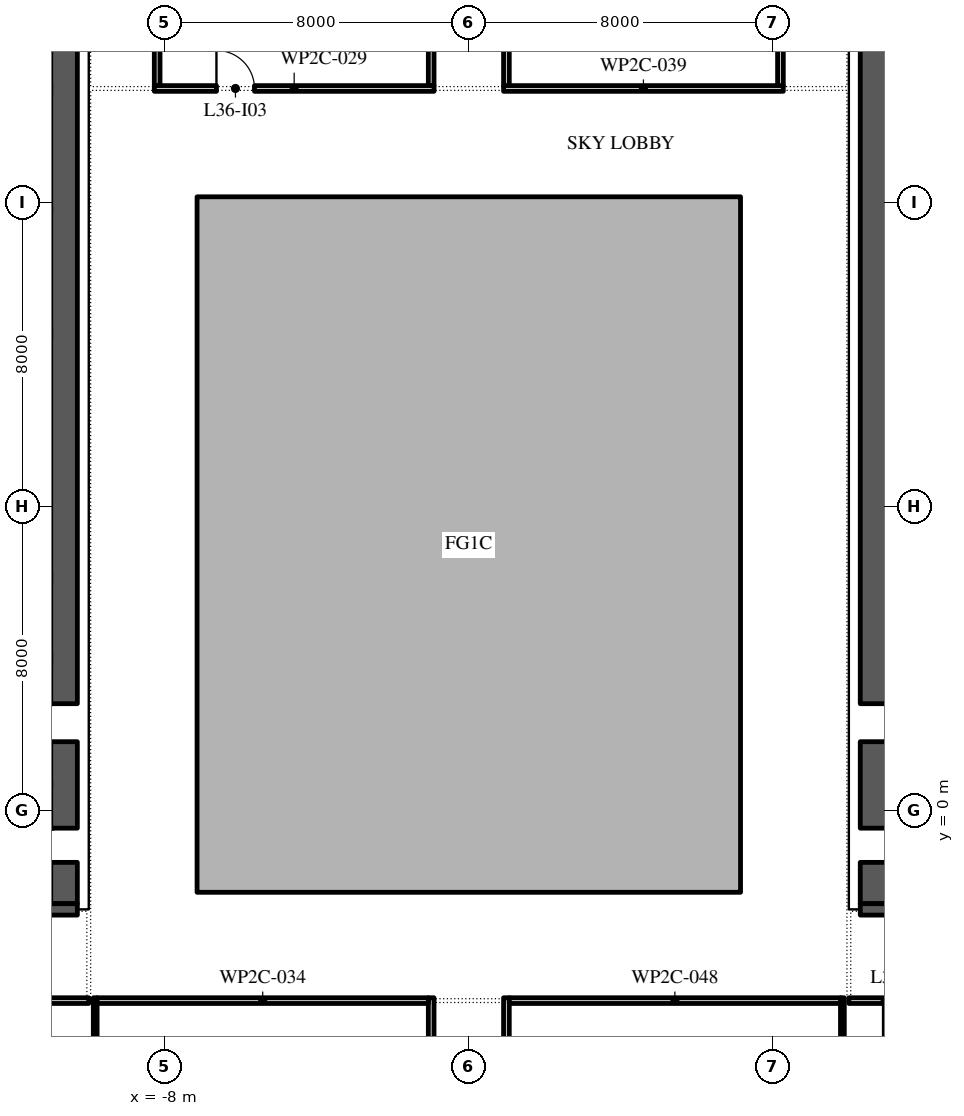
"""IFC4 building model, lengths in metres.
Left out: names, types, materials, properties, quantities, classifications, styles, units other than length and angle.
Written with IfcOpenShell. Run it as: python <this file> out.ifc"""

import sys

from ifc_helpers import new_model, si_unit, direction, frame, frame_2d, origin, place, context, subcontext, project, spatial, polyline, rectangle, outline, extrude, element, fill, save


model = new_model("IFC4")
c1 = context("Model", 3, precision=1e-05, world=origin(), true_north=direction((0.0, 1.0)))
c2 = subcontext(c1, "Body", "Model", "MODEL_VIEW")
j1 = project(units=[si_unit("LENGTHUNIT", "METRE"), si_unit("PLANEANGLEUNIT", "RADIAN")], contexts=[c1])
p1 = place(None, origin())
s1 = spatial("IfcSite", under=j1, at=p1, CompositionType="ELEMENT")
p2 = place(p1, origin())
s2 = spatial("IfcBuilding", under=s1, at=p2, CompositionType="ELEMENT")
p3 = place(p2, frame((0.0, 0.0, 165.6)))
s3 = spatial("IfcBuildingStorey", under=s2, at=p3, CompositionType="ELEMENT", Elevation=165.6)
p4 = place(p3, origin())
e1 = element("IfcWall", 1, at=p4, inside=s3, PredefinedType="STANDARD", context=c2, shape_type="SweptSolid", body=[
    extrude(outline(polyline([(-7.15, -2.15), (7.15, -2.15), (7.15, 16.15), (-7.15, 16.15), (-7.15, -2.15)]), holes=[polyline([(-7.0, -2.0), (-7.0, 16.0), (7.0, 16.0), (7.0, -2.0), (-7.0, -2.0)])]), origin(), (0.0, 0.0, 1.0), 5.8),
])
p5 = place(p3, frame((-10.65, -2.45, 0.0), z_axis=(0.0, 0.0, 1.0), x_axis=(0.0, 1.0, 0.0)))
e2 = element("IfcWall", 2, at=p5, inside=s3, PredefinedType="SHEAR", context=c2, shape_type="SweptSolid", body=[
    extrude(rectangle(XDim=27.9, YDim=0.7, at=frame_2d((13.95, 0.0))), origin(), (0.0, 0.0, 1.0), 5.8),
])
p6 = place(p5, frame((23.65, 0.0, 0.0)))
e3 = element("IfcOpeningElement", 3, at=p6, cuts=e2, PredefinedType="OPENING", context=c2, shape_type="SweptSolid", body=[
    extrude(rectangle(XDim=2.4, YDim=2.1, at=frame_2d((1.2, 1.05))), frame((0.0, 0.36, 0.0), z_axis=(0.0, -1.0, 0.0), x_axis=(1.0, 0.0, 0.0)), (0.0, 0.0, 1.0), 0.72),
])
p7 = place(p5, frame((1.087, 0.0, 0.0)))
e4 = element("IfcOpeningElement", 4, at=p7, cuts=e2, PredefinedType="OPENING", context=c2, shape_type="SweptSolid", body=[
    extrude(rectangle(XDim=0.9, YDim=2.1, at=frame_2d((0.45, 1.05))), frame((0.0, 0.36, 0.0), z_axis=(0.0, -1.0, 0.0), x_axis=(1.0, 0.0, 0.0)), (0.0, 0.0, 1.0), 0.72),
])
p8 = place(p5, frame((4.262, 0.0, 0.0)))
e5 = element("IfcOpeningElement", 5, at=p8, cuts=e2, PredefinedType="OPENING", context=c2, shape_type="SweptSolid", body=[
    extrude(rectangle(XDim=1.0, YDim=2.1, at=frame_2d((0.5, 1.05))), frame((0.0, 0.36, 0.0), z_axis=(0.0, -1.0, 0.0), x_axis=(1.0, 0.0, 0.0)), (0.0, 0.0, 1.0), 0.72),
])
p9 = place(p3, frame((-21.7, -2.6, 0.0), z_axis=(0.0, 0.0, 1.0), x_axis=(1.0, 0.0, 0.0)))
e6 = element("IfcWall", 6, at=p9, inside=s3, PredefinedType="SHEAR", context=c2, shape_type="SweptSolid", body=[
    extrude(rectangle(XDim=11.4, YDim=0.3, at=frame_2d((5.7, 0.0))), origin(), (0.0, 0.0, 1.0), 5.8),
])
p10 = place(p3, frame((10.65, -2.45, 0.0), z_axis=(0.0, 0.0, 1.0), x_axis=(0.0, 1.0, 0.0)))
e7 = element("IfcWall", 7, at=p10, inside=s3, PredefinedType="SHEAR", context=c2, shape_type="SweptSolid", body=[
    extrude(rectangle(XDim=27.9, YDim=0.7, at=frame_2d((13.95, 0.0))), origin(), (0.0, 0.0, 1.0), 5.8),
])
p11 = place(p10, frame((23.65, 0.0, 0.0)))
e8 = element("IfcOpeningElement", 8, at=p11, cuts=e7, PredefinedType="OPENING", context=c2, shape_type="SweptSolid", body=[
    extrude(rectangle(XDim=2.4, YDim=2.1, at=frame_2d((1.2, 1.05))), frame((0.0, 0.36, 0.0), z_axis=(0.0, -1.0, 0.0), x_axis=(1.0, 0.0, 0.0)), (0.0, 0.0, 1.0), 0.72),
])
p12 = place(p10, frame((1.087, 0.0, 0.0)))
e9 = element("IfcOpeningElement", 9, at=p12, cuts=e7, PredefinedType="OPENING", context=c2, shape_type="SweptSolid", body=[
    extrude(rectangle(XDim=0.9, YDim=2.1, at=frame_2d((0.45, 1.05))), frame((0.0, 0.36, 0.0), z_axis=(0.0, -1.0, 0.0), x_axis=(1.0, 0.0, 0.0)), (0.0, 0.0, 1.0), 0.72),
])
p13 = place(p10, frame((4.262, 0.0, 0.0)))
e10 = element("IfcOpeningElement", 10, at=p13, cuts=e7, PredefinedType="OPENING", context=c2, shape_type="SweptSolid", body=[
    extrude(rectangle(XDim=1.0, YDim=2.1, at=frame_2d((0.5, 1.05))), frame((0.0, 0.36, 0.0), z_axis=(0.0, -1.0, 0.0), x_axis=(1.0, 0.0, 0.0)), (0.0, 0.0, 1.0), 0.72),
])
p14 = place(p3, frame((10.3, -2.6, 0.0), z_axis=(0.0, 0.0, 1.0), x_axis=(1.0, 0.0, 0.0)))
e11 = element("IfcWall", 11, at=p14, inside=s3, PredefinedType="SHEAR", context=c2, shape_type="SweptSolid", body=[
    extrude(rectangle(XDim=11.4, YDim=0.3, at=frame_2d((5.7, 0.0))), origin(), (0.0, 0.0, 1.0), 5.8),
])
p15 = place(p3, frame((-10.0, -5.0, 0.0), z_axis=(0.0, 0.0, 1.0), x_axis=(-1.0, 0.0, 0.0)))
e12 = element("IfcWall", 12, at=p15, inside=s3, PredefinedType="PARTITIONING", context=c2, shape_type="SweptSolid", body=[
    extrude(rectangle(XDim=8.45, YDim=0.15, at=frame_2d((4.225, 0.0))), origin(), (0.0, 0.0, 1.0), 5.8),
])
p16 = place(p15, frame((2.85, 0.0, 0.0)))
e13 = element("IfcOpeningElement", 13, at=p16, cuts=e12, PredefinedType="OPENING", context=c2, shape_type="SweptSolid", body=[
    extrude(rectangle(XDim=1.0, YDim=2.1, at=frame_2d((0.5, 1.05))), frame((0.0, 0.085, 0.0), z_axis=(0.0, -1.0, 0.0), x_axis=(1.0, 0.0, 0.0)), (0.0, 0.0, 1.0), 0.17),
])
p17 = place(p3, frame((-9.83, -15.0, 0.0), z_axis=(0.0, 0.0, 1.0), x_axis=(0.0, 1.0, 0.0)))
e14 = element("IfcWall", 14, at=p17, inside=s3, PredefinedType="PARTITIONING", context=c2, shape_type="SweptSolid", body=[
    extrude(rectangle(XDim=10.075, YDim=0.1, at=frame_2d((5.038, 0.0))), origin(), (0.0, 0.0, 1.0), 5.8),
])
p18 = place(p3, frame((-8.275, 19.0, 0.0), z_axis=(0.0, 0.0, 1.0), x_axis=(1.0, 0.0, 0.0)))
e15 = element("IfcWall", 15, at=p18, inside=s3, PredefinedType="PARTITIONING", context=c2, shape_type="SweptSolid", body=[
    extrude(rectangle(XDim=7.36, YDim=0.15, at=frame_2d((3.68, 0.0))), origin(), (0.0, 0.0, 1.0), 5.8),
])
p19 = place(p18, frame((1.635, 0.0, 0.0)))
e16 = element("IfcOpeningElement", 16, at=p19, cuts=e15, PredefinedType="OPENING", context=c2, shape_type="SweptSolid", body=[
    extrude(rectangle(XDim=1.0, YDim=2.1, at=frame_2d((0.5, 1.05))), frame((0.0, 0.085, 0.0), z_axis=(0.0, -1.0, 0.0), x_axis=(1.0, 0.0, 0.0)), (0.0, 0.0, 1.0), 0.17),
])
p20 = place(p3, frame((-8.2, 23.54, 0.0), z_axis=(0.0, 0.0, 1.0), x_axis=(0.0, -1.0, 0.0)))
e17 = element("IfcWall", 17, at=p20, inside=s3, PredefinedType="PARTITIONING", context=c2, shape_type="SweptSolid", body=[
    extrude(rectangle(XDim=4.465, YDim=0.15, at=frame_2d((2.232, 0.0))), origin(), (0.0, 0.0, 1.0), 5.8),
])
p21 = place(p3, frame((-0.99, -16.753, 0.0), z_axis=(0.0, 0.0, 1.0), x_axis=(0.0, 1.0, 0.0)))
e18 = element("IfcWall", 18, at=p21, inside=s3, PredefinedType="PARTITIONING", context=c2, shape_type="SweptSolid", body=[
    extrude(rectangle(XDim=11.828, YDim=0.15, at=frame_2d((5.914, 0.0))), origin(), (0.0, 0.0, 1.0), 5.8),
])
p22 = place(p21, frame((2.853, 0.0, 0.0)))
e19 = element("IfcOpeningElement", 19, at=p22, cuts=e18, PredefinedType="OPENING", context=c2, shape_type="SweptSolid", body=[
    extrude(rectangle(XDim=1.0, YDim=2.1, at=frame_2d((0.5, 1.05))), frame((0.0, 0.085, 0.0), z_axis=(0.0, -1.0, 0.0), x_axis=(1.0, 0.0, 0.0)), (0.0, 0.0, 1.0), 0.17),
])
p23 = place(p3, frame((-1.065, -5.0, 0.0), z_axis=(0.0, 0.0, 1.0), x_axis=(-1.0, 0.0, 0.0)))
e20 = element("IfcWall", 20, at=p23, inside=s3, PredefinedType="PARTITIONING", context=c2, shape_type="SweptSolid", body=[
    extrude(rectangle(XDim=8.715, YDim=0.15, at=frame_2d((4.357, 0.0))), origin(), (0.0, 0.0, 1.0), 5.8),
])
p24 = place(p3, frame((-0.99, 19.075, 0.0), z_axis=(0.0, 0.0, 1.0), x_axis=(0.0, 1.0, 0.0)))
e21 = element("IfcWall", 21, at=p24, inside=s3, PredefinedType="PARTITIONING", context=c2, shape_type="SweptSolid", body=[
    extrude(rectangle(XDim=4.365, YDim=0.15, at=frame_2d((2.183, 0.0))), origin(), (0.0, 0.0, 1.0), 5.8),
])
p25 = place(p3, frame((0.99, -4.925, 0.0), z_axis=(0.0, 0.0, 1.0), x_axis=(0.0, -1.0, 0.0)))
e22 = element("IfcWall", 22, at=p25, inside=s3, PredefinedType="PARTITIONING", context=c2, shape_type="SweptSolid", body=[
    extrude(rectangle(XDim=11.371, YDim=0.15, at=frame_2d((5.686, 0.0))), origin(), (0.0, 0.0, 1.0), 5.8),
])
p26 = place(p25, frame((5.445, 0.0, 0.0)))
e23 = element("IfcOpeningElement", 23, at=p26, cuts=e22, PredefinedType="OPENING", context=c2, shape_type="SweptSolid", body=[
    extrude(rectangle(XDim=1.0, YDim=2.1, at=frame_2d((0.5, 1.05))), frame((0.0, 0.085, 0.0), z_axis=(0.0, -1.0, 0.0), x_axis=(1.0, 0.0, 0.0)), (0.0, 0.0, 1.0), 0.17),
])
p27 = place(p3, frame((0.915, 19.0, 0.0), z_axis=(0.0, 0.0, 1.0), x_axis=(1.0, 0.0, 0.0)))
e24 = element("IfcWall", 24, at=p27, inside=s3, PredefinedType="PARTITIONING", context=c2, shape_type="SweptSolid", body=[
    extrude(rectangle(XDim=7.36, YDim=0.15, at=frame_2d((3.68, 0.0))), origin(), (0.0, 0.0, 1.0), 5.8),
])
p28 = place(p3, frame((0.99, 31.55, 0.0), z_axis=(0.0, 0.0, 1.0), x_axis=(0.0, -1.0, 0.0)))
e25 = element("IfcWall", 25, at=p28, inside=s3, PredefinedType="PARTITIONING", context=c2, shape_type="SweptSolid", body=[
    extrude(rectangle(XDim=12.475, YDim=0.15, at=frame_2d((6.238, 0.0))), origin(), (0.0, 0.0, 1.0), 5.8),
])
p29 = place(p28, frame((5.9, 0.0, 0.0)))
e26 = element("IfcOpeningElement", 26, at=p29, cuts=e25, PredefinedType="OPENING", context=c2, shape_type="SweptSolid", body=[
    extrude(rectangle(XDim=1.0, YDim=2.1, at=frame_2d((0.5, 1.05))), frame((0.0, 0.085, 0.0), z_axis=(0.0, -1.0, 0.0), x_axis=(1.0, 0.0, 0.0)), (0.0, 0.0, 1.0), 0.17),
])
p30 = place(p3, frame((8.2, 19.075, 0.0), z_axis=(0.0, 0.0, 1.0), x_axis=(0.0, 1.0, 0.0)))
e27 = element("IfcWall", 27, at=p30, inside=s3, PredefinedType="PARTITIONING", context=c2, shape_type="SweptSolid", body=[
    extrude(rectangle(XDim=8.2, YDim=0.15, at=frame_2d((4.1, 0.0))), origin(), (0.0, 0.0, 1.0), 5.8),
])
p31 = place(p3, frame((9.83, -14.255, 0.0), z_axis=(0.0, 0.0, 1.0), x_axis=(0.0, 1.0, 0.0)))
e28 = element("IfcWall", 28, at=p31, inside=s3, PredefinedType="PARTITIONING", context=c2, shape_type="SweptSolid", body=[
    extrude(rectangle(XDim=9.33, YDim=0.1, at=frame_2d((4.665, 0.0))), origin(), (0.0, 0.0, 1.0), 5.8),
])
p32 = place(p3, frame((9.78, -5.0, 0.0), z_axis=(0.0, 0.0, 1.0), x_axis=(-1.0, 0.0, 0.0)))
e29 = element("IfcWall", 29, at=p32, inside=s3, PredefinedType="PARTITIONING", context=c2, shape_type="SweptSolid", body=[
    extrude(rectangle(XDim=8.715, YDim=0.15, at=frame_2d((4.357, 0.0))), origin(), (0.0, 0.0, 1.0), 5.8),
])
p33 = place(p3, frame((14.38, -5.0, 0.0), z_axis=(0.0, 0.0, 1.0), x_axis=(-1.0, 0.0, 0.0)))
e30 = element("IfcWall", 30, at=p33, inside=s3, PredefinedType="PARTITIONING", context=c2, shape_type="SweptSolid", body=[
    extrude(rectangle(XDim=4.38, YDim=0.15, at=frame_2d((2.19, 0.0))), origin(), (0.0, 0.0, 1.0), 5.8),
])
p34 = place(p33, frame((2.48, 0.0, 0.0)))
e31 = element("IfcOpeningElement", 31, at=p34, cuts=e30, PredefinedType="OPENING", context=c2, shape_type="SweptSolid", body=[
    extrude(rectangle(XDim=1.0, YDim=2.1, at=frame_2d((0.5, 1.05))), frame((0.0, 0.085, 0.0), z_axis=(0.0, -1.0, 0.0), x_axis=(1.0, 0.0, 0.0)), (0.0, 0.0, 1.0), 0.17),
])
p35 = place(p19, origin())
e32 = element("IfcDoor", 32, at=p35, inside=s3, OperationType="SINGLE_SWING_RIGHT", PredefinedType="DOOR", context=c2, shape_type="SweptSolid", body=[
    extrude(rectangle(XDim=1.0, YDim=2.1, at=frame_2d((0.5, 1.05))), frame((0.0, 0.025, 0.0), z_axis=(0.0, -1.0, 0.0), x_axis=(1.0, 0.0, 0.0)), (0.0, 0.0, 1.0), 0.05),
])
fill(e16, e32)
p36 = place(p34, origin())
e33 = element("IfcDoor", 33, at=p36, inside=s3, OperationType="SINGLE_SWING_LEFT", PredefinedType="DOOR", context=c2, shape_type="SweptSolid", body=[
    extrude(rectangle(XDim=1.0, YDim=2.1, at=frame_2d((0.5, 1.05))), frame((0.0, 0.025, 0.0), z_axis=(0.0, -1.0, 0.0), x_axis=(1.0, 0.0, 0.0)), (0.0, 0.0, 1.0), 0.05),
])
fill(e31, e33)
save(model, sys.argv[1])
